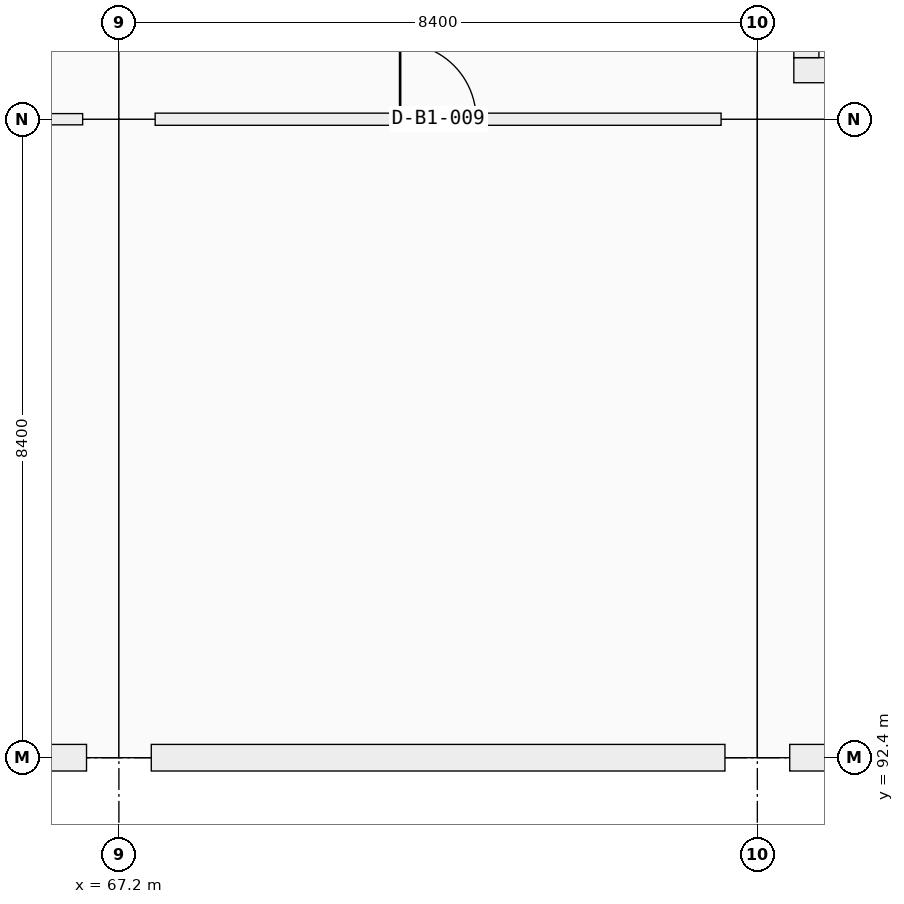
"""IFC4 building model, lengths in metres.
Left out: names, types, materials, properties, quantities, classifications, styles, units other than length and angle.
Written with IfcOpenShell. Run it as: python <this file> out.ifc"""

import sys

from ifc_helpers import new_model, si_unit, direction, frame, frame_2d, origin, origin_2d, place, context, subcontext, project, spatial, rectangle, extrude, element, fill, save


model = new_model("IFC4")
c1 = context("Model", 3, precision=1e-05, world=origin(), true_north=direction((0.0, 1.0)))
c2 = subcontext(c1, "Body", "Model", "MODEL_VIEW")
j1 = project(units=[si_unit("LENGTHUNIT", "METRE"), si_unit("PLANEANGLEUNIT", "RADIAN")], contexts=[c1])
p1 = place(None, origin())
s1 = spatial("IfcSite", under=j1, at=p1, CompositionType="ELEMENT")
p2 = place(p1, origin())
s2 = spatial("IfcBuilding", under=s1, at=p2, CompositionType="ELEMENT")
p3 = place(p2, frame((0.0, 0.0, -4.5)))
s3 = spatial("IfcBuildingStorey", under=s2, at=p3, CompositionType="ELEMENT", Elevation=-4.5)
p4 = place(p3, frame((67.2, 92.4, -0.35), z_axis=(0.0, 0.0, 1.0), x_axis=(1.0, 0.0, 0.0)))
e1 = element("IfcColumn", 1, at=p4, inside=s3, PredefinedType="COLUMN", context=c2, shape_type="SweptSolid", body=[
    extrude(rectangle(XDim=0.85, YDim=0.85, at=origin_2d()), origin(), (0.0, 0.0, 1.0), 4.5),
])
p5 = place(p3, frame((67.2, 100.8, -0.35), z_axis=(0.0, 0.0, 1.0), x_axis=(1.0, 0.0, 0.0)))
e2 = element("IfcColumn", 2, at=p5, inside=s3, PredefinedType="COLUMN", context=c2, shape_type="SweptSolid", body=[
    extrude(rectangle(XDim=0.95, YDim=0.95, at=origin_2d()), origin(), (0.0, 0.0, 1.0), 4.85),
])
p6 = place(p3, frame((75.6, 92.4, -0.35), z_axis=(0.0, 0.0, 1.0), x_axis=(1.0, 0.0, 0.0)))
e3 = element("IfcColumn", 3, at=p6, inside=s3, PredefinedType="COLUMN", context=c2, shape_type="SweptSolid", body=[
    extrude(rectangle(XDim=0.85, YDim=0.85, at=origin_2d()), origin(), (0.0, 0.0, 1.0), 4.5),
])
p7 = place(p3, frame((75.6, 100.8, -0.35), z_axis=(0.0, 0.0, 1.0), x_axis=(1.0, 0.0, 0.0)))
e4 = element("IfcColumn", 4, at=p7, inside=s3, PredefinedType="COLUMN", context=c2, shape_type="SweptSolid", body=[
    extrude(rectangle(XDim=0.95, YDim=0.95, at=origin_2d()), origin(), (0.0, 0.0, 1.0), 4.85),
])
p8 = place(p3, frame((66.774, 92.4, 0.0), z_axis=(0.0, 0.0, 1.0), x_axis=(-1.0, 0.0, 0.0)))
e5 = element("IfcWall", 5, at=p8, inside=s3, PredefinedType="SOLIDWALL", context=c2, shape_type="SweptSolid", body=[
    extrude(rectangle(XDim=7.498, YDim=0.35, at=frame_2d((3.749, 0.0))), origin(), (0.0, 0.0, 1.0), 3.35),
])
for number, where, z_axis, x_axis in (
    (6, (75.174, 92.4, 0.0), (0.0, 0.0, 1.0), (-1.0, 0.0, 0.0)),
    (7, (83.574, 92.4, 0.0), (0.0, 0.0, 1.0), (-1.0, 0.0, 0.0)),
):
    element("IfcWall", number, at=place(p3, frame(where, z_axis=z_axis, x_axis=x_axis)), inside=s3, PredefinedType="SOLIDWALL", context=c2, shape_type="SweptSolid", body=[
        extrude(rectangle(XDim=7.548, YDim=0.35, at=frame_2d((3.774, 0.0))), origin(), (0.0, 0.0, 1.0), 3.35),
    ])
p9 = place(p3, frame((83.52, 101.445, -0.35), z_axis=(0.0, 0.0, 1.0), x_axis=(-1.0, 0.0, 0.0)))
e8 = element("IfcWall", 8, at=p9, inside=s3, PredefinedType="SHEAR", context=c2, shape_type="SweptSolid", body=[
    extrude(rectangle(XDim=7.44, YDim=0.33, at=frame_2d((3.72, 0.0))), origin(), (0.0, 0.0, 1.0), 4.85),
])
p10 = place(p9, frame((1.28, 0.0, 0.35)))
e9 = element("IfcOpeningElement", 9, at=p10, cuts=e8, PredefinedType="OPENING", context=c2, shape_type="SweptSolid", body=[
    extrude(rectangle(XDim=1.5, YDim=2.15, at=frame_2d((0.75, 1.075))), frame((0.0, 0.165, 0.0), z_axis=(0.0, -1.0, 0.0), x_axis=(1.0, 0.0, 0.0)), (0.0, 0.0, 1.0), 0.33),
])
p11 = place(p3, frame((76.245, 101.61, -0.35), z_axis=(0.0, 0.0, 1.0), x_axis=(0.0, 1.0, 0.0)))
e10 = element("IfcWall", 10, at=p11, inside=s3, PredefinedType="SHEAR", context=c2, shape_type="SweptSolid", body=[
    extrude(rectangle(XDim=6.78, YDim=0.33, at=frame_2d((3.39, 0.0))), origin(), (0.0, 0.0, 1.0), 4.85),
])
p12 = place(p3, frame((59.277, 100.8, 0.0), z_axis=(0.0, 0.0, 1.0), x_axis=(1.0, 0.0, 0.0)))
e11 = element("IfcWall", 11, at=p12, inside=s3, PredefinedType="PARTITIONING", context=c2, shape_type="SweptSolid", body=[
    extrude(rectangle(XDim=7.446, YDim=0.148, at=frame_2d((3.723, 0.0))), origin(), (0.0, 0.0, 1.0), 3.27),
])
p13 = place(p12, frame((3.198, 0.0, 0.0)))
e12 = element("IfcOpeningElement", 12, at=p13, cuts=e11, PredefinedType="OPENING", context=c2, shape_type="SweptSolid", body=[
    extrude(rectangle(XDim=1.05, YDim=2.15, at=frame_2d((0.525, 1.075))), frame((0.0, 0.074, 0.0), z_axis=(0.0, -1.0, 0.0), x_axis=(1.0, 0.0, 0.0)), (0.0, 0.0, 1.0), 0.148),
])
p14 = place(p3, frame((67.677, 100.8, 0.0), z_axis=(0.0, 0.0, 1.0), x_axis=(1.0, 0.0, 0.0)))
e13 = element("IfcWall", 13, at=p14, inside=s3, PredefinedType="PARTITIONING", context=c2, shape_type="SweptSolid", body=[
    extrude(rectangle(XDim=7.446, YDim=0.16, at=frame_2d((3.723, 0.0))), origin(), (0.0, 0.0, 1.0), 3.27),
])
p15 = place(p14, frame((3.223, 0.0, 0.0)))
e14 = element("IfcOpeningElement", 14, at=p15, cuts=e13, PredefinedType="OPENING", context=c2, shape_type="SweptSolid", body=[
    extrude(rectangle(XDim=1.0, YDim=2.15, at=frame_2d((0.5, 1.075))), frame((0.0, 0.08, 0.0), z_axis=(0.0, -1.0, 0.0), x_axis=(1.0, 0.0, 0.0)), (0.0, 0.0, 1.0), 0.16),
])
p16 = place(p15, origin())
e15 = element("IfcDoor", 15, at=p16, inside=s3, OperationType="SINGLE_SWING_LEFT", PredefinedType="DOOR", context=c2, shape_type="SweptSolid", body=[
    extrude(rectangle(XDim=1.0, YDim=2.15, at=frame_2d((0.5, 1.075))), frame((0.0, 0.025, 0.0), z_axis=(0.0, -1.0, 0.0), x_axis=(1.0, 0.0, 0.0)), (0.0, 0.0, 1.0), 0.05),
])
fill(e14, e15)
save(model, sys.argv[1])
